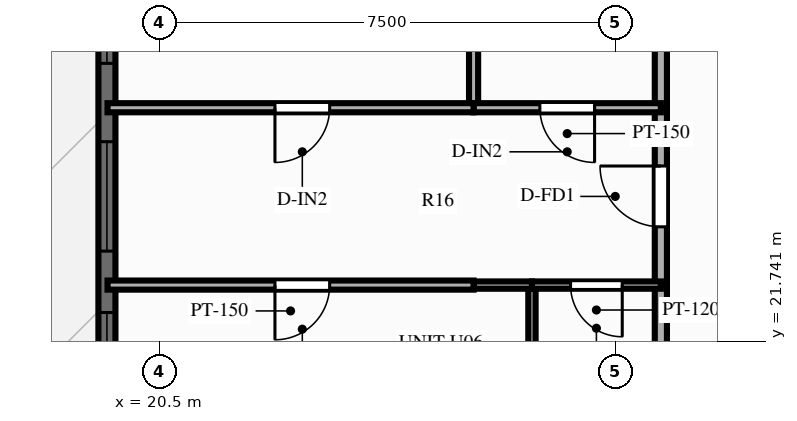
"""IFC4 building model, lengths in metres.
Left out: names, types, materials, properties, quantities, classifications, styles, units other than length and angle.
Written with IfcOpenShell. Run it as: python <this file> out.ifc"""

import sys

from ifc_helpers import new_model, si_unit, direction, frame, frame_2d, origin, place, context, subcontext, project, spatial, rectangle, extrude, source, transform, mapped, element, fill, save


model = new_model("IFC4")
c1 = context("Model", 3, precision=1e-05, world=origin(), true_north=direction((0.0, 1.0)))
c2 = subcontext(c1, "Body", "Model", "MODEL_VIEW")
j1 = project(units=[si_unit("LENGTHUNIT", "METRE"), si_unit("PLANEANGLEUNIT", "RADIAN")], contexts=[c1])
p1 = place(None, origin())
s1 = spatial("IfcSite", under=j1, at=p1, CompositionType="ELEMENT")
p2 = place(p1, origin())
s2 = spatial("IfcBuilding", under=s1, at=p2, CompositionType="ELEMENT")
p3 = place(p2, frame((0.0, 0.0, 202.6)))
s3 = spatial("IfcBuildingStorey", under=s2, at=p3, CompositionType="ELEMENT", Elevation=202.6)
p4 = place(p3, frame((19.64, 11.5, 0.0), z_axis=(0.0, 0.0, 1.0), x_axis=(0.0, 1.0, 0.0)))
e1 = element("IfcWall", 1, at=p4, inside=s3, PredefinedType="SOLIDWALL", context=c2, shape_type="SweptSolid", body=[
    extrude(rectangle(XDim=31.0, YDim=0.28, at=frame_2d((15.5, 0.0))), origin(), (0.0, 0.0, 1.0), 2.79),
])
p5 = place(p4, frame((0.661, 0.0, 0.85)))
e2 = element("IfcOpeningElement", 2, at=p5, cuts=e1, PredefinedType="OPENING", context=c2, shape_type="SweptSolid", body=[
    extrude(rectangle(XDim=1.5, YDim=1.65, at=frame_2d((0.75, 0.825))), frame((0.0, 0.152, 0.0), z_axis=(0.0, -1.0, 0.0), x_axis=(1.0, 0.0, 0.0)), (0.0, 0.0, 1.0), 0.304),
])
p6 = place(p4, frame((3.131, 0.0, 0.85)))
e3 = element("IfcOpeningElement", 3, at=p6, cuts=e1, PredefinedType="OPENING", context=c2, shape_type="SweptSolid", body=[
    extrude(rectangle(XDim=1.5, YDim=1.65, at=frame_2d((0.75, 0.825))), frame((0.0, 0.152, 0.0), z_axis=(0.0, -1.0, 0.0), x_axis=(1.0, 0.0, 0.0)), (0.0, 0.0, 1.0), 0.304),
])
p7 = place(p4, frame((7.15, 0.0, 0.85)))
e4 = element("IfcOpeningElement", 4, at=p7, cuts=e1, PredefinedType="OPENING", context=c2, shape_type="SweptSolid", body=[
    extrude(rectangle(XDim=1.2, YDim=1.5, at=frame_2d((0.6, 0.75))), frame((0.0, 0.152, 0.0), z_axis=(0.0, -1.0, 0.0), x_axis=(1.0, 0.0, 0.0)), (0.0, 0.0, 1.0), 0.304),
])
p8 = place(p4, frame((9.21, 0.0, 0.85)))
e5 = element("IfcOpeningElement", 5, at=p8, cuts=e1, PredefinedType="OPENING", context=c2, shape_type="SweptSolid", body=[
    extrude(rectangle(XDim=1.5, YDim=1.65, at=frame_2d((0.75, 0.825))), frame((0.0, 0.152, 0.0), z_axis=(0.0, -1.0, 0.0), x_axis=(1.0, 0.0, 0.0)), (0.0, 0.0, 1.0), 0.304),
])
p9 = place(p4, frame((11.72, 0.0, 0.85)))
e6 = element("IfcOpeningElement", 6, at=p9, cuts=e1, PredefinedType="OPENING", context=c2, shape_type="SweptSolid", body=[
    extrude(rectangle(XDim=1.8, YDim=1.65, at=frame_2d((0.9, 0.825))), frame((0.0, 0.152, 0.0), z_axis=(0.0, -1.0, 0.0), x_axis=(1.0, 0.0, 0.0)), (0.0, 0.0, 1.0), 0.304),
])
p10 = place(p4, frame((14.808, 0.0, 0.85)))
e7 = element("IfcOpeningElement", 7, at=p10, cuts=e1, PredefinedType="OPENING", context=c2, shape_type="SweptSolid", body=[
    extrude(rectangle(XDim=1.8, YDim=1.65, at=frame_2d((0.9, 0.825))), frame((0.0, 0.152, 0.0), z_axis=(0.0, -1.0, 0.0), x_axis=(1.0, 0.0, 0.0)), (0.0, 0.0, 1.0), 0.304),
])
p11 = place(p4, frame((18.484, 0.0, 0.0)))
e8 = element("IfcOpeningElement", 8, at=p11, cuts=e1, PredefinedType="OPENING", context=c2, shape_type="SweptSolid", body=[
    extrude(rectangle(XDim=1.6, YDim=2.15, at=frame_2d((0.8, 1.075))), frame((0.0, 0.152, 0.0), z_axis=(0.0, -1.0, 0.0), x_axis=(1.0, 0.0, 0.0)), (0.0, 0.0, 1.0), 0.304),
])
p12 = place(p4, frame((21.754, 0.0, 0.85)))
e9 = element("IfcOpeningElement", 9, at=p12, cuts=e1, PredefinedType="OPENING", context=c2, shape_type="SweptSolid", body=[
    extrude(rectangle(XDim=1.8, YDim=1.65, at=frame_2d((0.9, 0.825))), frame((0.0, 0.152, 0.0), z_axis=(0.0, -1.0, 0.0), x_axis=(1.0, 0.0, 0.0)), (0.0, 0.0, 1.0), 0.304),
])
p13 = place(p4, frame((25.235, 0.0, 0.85)))
e10 = element("IfcOpeningElement", 10, at=p13, cuts=e1, PredefinedType="OPENING", context=c2, shape_type="SweptSolid", body=[
    extrude(rectangle(XDim=1.2, YDim=1.5, at=frame_2d((0.6, 0.75))), frame((0.0, 0.152, 0.0), z_axis=(0.0, -1.0, 0.0), x_axis=(1.0, 0.0, 0.0)), (0.0, 0.0, 1.0), 0.304),
])
p14 = place(p4, frame((27.945, 0.0, 0.85)))
e11 = element("IfcOpeningElement", 11, at=p14, cuts=e1, PredefinedType="OPENING", context=c2, shape_type="SweptSolid", body=[
    extrude(rectangle(XDim=1.8, YDim=1.65, at=frame_2d((0.9, 0.825))), frame((0.0, 0.152, 0.0), z_axis=(0.0, -1.0, 0.0), x_axis=(1.0, 0.0, 0.0)), (0.0, 0.0, 1.0), 0.304),
])
p15 = place(p3, frame((28.75, 20.259, 0.0), z_axis=(0.0, 0.0, 1.0), x_axis=(0.0, 1.0, 0.0)))
e12 = element("IfcWall", 12, at=p15, inside=s3, PredefinedType="PARTITIONING", context=c2, shape_type="SweptSolid", body=[
    extrude(rectangle(XDim=2.402, YDim=0.2, at=frame_2d((1.201, 0.0))), origin(), (0.0, 0.0, 1.0), 3.6),
])
p16 = place(p3, frame((28.75, 22.661, 0.0), z_axis=(0.0, 0.0, 1.0), x_axis=(0.0, 1.0, 0.0)))
e13 = element("IfcWall", 13, at=p16, inside=s3, PredefinedType="PARTITIONING", context=c2, shape_type="SweptSolid", body=[
    extrude(rectangle(XDim=2.917, YDim=0.2, at=frame_2d((1.458, 0.0))), origin(), (0.0, 0.0, 1.0), 3.6),
])
p17 = place(p16, frame((0.958, 0.0, 0.0)))
e14 = element("IfcOpeningElement", 14, at=p17, cuts=e13, PredefinedType="OPENING", context=c2, shape_type="SweptSolid", body=[
    extrude(rectangle(XDim=1.0, YDim=2.15, at=frame_2d((0.5, 1.075))), frame((0.0, 0.112, 0.0), z_axis=(0.0, -1.0, 0.0), x_axis=(1.0, 0.0, 0.0)), (0.0, 0.0, 1.0), 0.224),
])
p18 = place(p3, frame((28.75, 25.578, 0.0), z_axis=(0.0, 0.0, 1.0), x_axis=(0.0, 1.0, 0.0)))
e15 = element("IfcWall", 15, at=p18, inside=s3, PredefinedType="PARTITIONING", context=c2, shape_type="SweptSolid", body=[
    extrude(rectangle(XDim=3.26, YDim=0.2, at=frame_2d((1.63, 0.0))), origin(), (0.0, 0.0, 1.0), 3.6),
])
p19 = place(p3, frame((26.63, 20.259, 0.0), z_axis=(0.0, 0.0, 1.0), x_axis=(0.0, 1.0, 0.0)))
e16 = element("IfcWall", 16, at=p19, inside=s3, PredefinedType="PARTITIONING", context=c2, shape_type="SweptSolid", body=[
    extrude(rectangle(XDim=2.402, YDim=0.12, at=frame_2d((1.201, 0.0))), origin(), (0.0, 0.0, 1.0), 3.6),
])
p20 = place(p3, frame((25.67, 25.578, 0.0), z_axis=(0.0, 0.0, 1.0), x_axis=(0.0, 1.0, 0.0)))
e17 = element("IfcWall", 17, at=p20, inside=s3, PredefinedType="PARTITIONING", context=c2, shape_type="SweptSolid", body=[
    extrude(rectangle(XDim=3.26, YDim=0.15, at=frame_2d((1.63, 0.0))), origin(), (0.0, 0.0, 1.0), 3.39),
])
p21 = place(p3, frame((28.75, 22.661, 0.0), z_axis=(0.0, 0.0, 1.0), x_axis=(-1.0, 0.0, 0.0)))
e18 = element("IfcWall", 18, at=p21, inside=s3, PredefinedType="PARTITIONING", context=c2, shape_type="SweptSolid", body=[
    extrude(rectangle(XDim=2.12, YDim=0.12, at=frame_2d((1.06, 0.0))), origin(), (0.0, 0.0, 1.0), 3.6),
])
p22 = place(p21, frame((0.635, 0.0, 0.0)))
e19 = element("IfcOpeningElement", 19, at=p22, cuts=e18, PredefinedType="OPENING", context=c2, shape_type="SweptSolid", body=[
    extrude(rectangle(XDim=0.85, YDim=2.05, at=frame_2d((0.425, 1.025))), frame((0.0, 0.072, 0.0), z_axis=(0.0, -1.0, 0.0), x_axis=(1.0, 0.0, 0.0)), (0.0, 0.0, 1.0), 0.144),
])
p23 = place(p3, frame((26.63, 22.661, 0.0), z_axis=(0.0, 0.0, 1.0), x_axis=(-1.0, 0.0, 0.0)))
e20 = element("IfcWall", 20, at=p23, inside=s3, PredefinedType="PARTITIONING", context=c2, shape_type="SweptSolid", body=[
    extrude(rectangle(XDim=0.96, YDim=0.12, at=frame_2d((0.48, 0.0))), origin(), (0.0, 0.0, 1.0), 3.6),
])
p24 = place(p3, frame((25.67, 22.661, 0.0), z_axis=(0.0, 0.0, 1.0), x_axis=(-1.0, 0.0, 0.0)))
e21 = element("IfcWall", 21, at=p24, inside=s3, PredefinedType="PARTITIONING", context=c2, shape_type="SweptSolid", body=[
    extrude(rectangle(XDim=6.02, YDim=0.15, at=frame_2d((3.01, 0.0))), origin(), (0.0, 0.0, 1.0), 3.6),
])
p25 = place(p24, frame((2.367, 0.0, 0.0)))
e22 = element("IfcOpeningElement", 22, at=p25, cuts=e21, PredefinedType="OPENING", context=c2, shape_type="SweptSolid", body=[
    extrude(rectangle(XDim=0.9, YDim=2.1, at=frame_2d((0.45, 1.05))), frame((0.0, 0.087, 0.0), z_axis=(0.0, -1.0, 0.0), x_axis=(1.0, 0.0, 0.0)), (0.0, 0.0, 1.0), 0.174),
])
p26 = place(p3, frame((28.75, 25.578, 0.0), z_axis=(0.0, 0.0, 1.0), x_axis=(-1.0, 0.0, 0.0)))
e23 = element("IfcWall", 23, at=p26, inside=s3, PredefinedType="PARTITIONING", context=c2, shape_type="SweptSolid", body=[
    extrude(rectangle(XDim=3.08, YDim=0.15, at=frame_2d((1.54, 0.0))), origin(), (0.0, 0.0, 1.0), 3.6),
])
p27 = place(p26, frame((1.09, 0.0, 0.0)))
e24 = element("IfcOpeningElement", 24, at=p27, cuts=e23, PredefinedType="OPENING", context=c2, shape_type="SweptSolid", body=[
    extrude(rectangle(XDim=0.9, YDim=2.1, at=frame_2d((0.45, 1.05))), frame((0.0, 0.087, 0.0), z_axis=(0.0, -1.0, 0.0), x_axis=(1.0, 0.0, 0.0)), (0.0, 0.0, 1.0), 0.174),
])
p28 = place(p3, frame((25.67, 25.578, 0.0), z_axis=(0.0, 0.0, 1.0), x_axis=(-1.0, 0.0, 0.0)))
e25 = element("IfcWall", 25, at=p28, inside=s3, PredefinedType="PARTITIONING", context=c2, shape_type="SweptSolid", body=[
    extrude(rectangle(XDim=6.02, YDim=0.15, at=frame_2d((3.01, 0.0))), origin(), (0.0, 0.0, 1.0), 3.6),
])
p29 = place(p28, frame((2.367, 0.0, 0.0)))
e26 = element("IfcOpeningElement", 26, at=p29, cuts=e25, PredefinedType="OPENING", context=c2, shape_type="SweptSolid", body=[
    extrude(rectangle(XDim=0.9, YDim=2.1, at=frame_2d((0.45, 1.05))), frame((0.0, 0.087, 0.0), z_axis=(0.0, -1.0, 0.0), x_axis=(1.0, 0.0, 0.0)), (0.0, 0.0, 1.0), 0.174),
])
m1 = source(origin(), c2, "Body", "SweptSolid", [
    extrude(rectangle(XDim=1.5, YDim=1.65, at=frame_2d((0.75, 0.825))), frame((0.0, 0.03, 0.0), z_axis=(0.0, -1.0, 0.0), x_axis=(1.0, 0.0, 0.0)), (0.0, 0.0, 1.0), 0.06),
])
p30 = place(p8, origin())
e27 = element("IfcWindow", 27, at=p30, inside=s3, PartitioningType="SINGLE_PANEL", PredefinedType="WINDOW", context=c2, shape_type="MappedRepresentation", body=[
    mapped(m1, transform((0.0, 0.0, 0.0), scale=1.0)),
])
fill(e5, e27)
m2 = source(origin(), c2, "Body", "SweptSolid", [
    extrude(rectangle(XDim=1.8, YDim=1.65, at=frame_2d((0.9, 0.825))), frame((0.0, 0.03, 0.0), z_axis=(0.0, -1.0, 0.0), x_axis=(1.0, 0.0, 0.0)), (0.0, 0.0, 1.0), 0.06),
])
p31 = place(p9, origin())
e28 = element("IfcWindow", 28, at=p31, inside=s3, PartitioningType="SINGLE_PANEL", PredefinedType="WINDOW", context=c2, shape_type="MappedRepresentation", body=[
    mapped(m2, transform((0.0, 0.0, 0.0), scale=1.0)),
])
fill(e6, e28)
p32 = place(p10, origin())
e29 = element("IfcWindow", 29, at=p32, inside=s3, PartitioningType="SINGLE_PANEL", PredefinedType="WINDOW", context=c2, shape_type="MappedRepresentation", body=[
    mapped(m2, transform((0.0, 0.0, 0.0), scale=1.0)),
])
fill(e7, e29)
m3 = source(origin(), c2, "Body", "SweptSolid", [
    extrude(rectangle(XDim=1.0, YDim=2.15, at=frame_2d((0.5, 1.075))), frame((0.0, 0.025, 0.0), z_axis=(0.0, -1.0, 0.0), x_axis=(1.0, 0.0, 0.0)), (0.0, 0.0, 1.0), 0.05),
])
p33 = place(p17, origin())
e30 = element("IfcDoor", 30, at=p33, inside=s3, OperationType="SINGLE_SWING_RIGHT", PredefinedType="DOOR", context=c2, shape_type="MappedRepresentation", body=[
    mapped(m3, transform((0.0, 0.0, 0.0), scale=1.0)),
])
fill(e14, e30)
m4 = source(origin(), c2, "Body", "SweptSolid", [
    extrude(rectangle(XDim=0.85, YDim=2.05, at=frame_2d((0.425, 1.025))), frame((0.0, 0.025, 0.0), z_axis=(0.0, -1.0, 0.0), x_axis=(1.0, 0.0, 0.0)), (0.0, 0.0, 1.0), 0.05),
])
p34 = place(p22, origin())
e31 = element("IfcDoor", 31, at=p34, inside=s3, OperationType="SINGLE_SWING_LEFT", PredefinedType="DOOR", context=c2, shape_type="MappedRepresentation", body=[
    mapped(m4, transform((0.0, 0.0, 0.0), scale=1.0)),
])
fill(e19, e31)
m5 = source(origin(), c2, "Body", "SweptSolid", [
    extrude(rectangle(XDim=0.9, YDim=2.1, at=frame_2d((0.45, 1.05))), frame((0.0, 0.025, 0.0), z_axis=(0.0, -1.0, 0.0), x_axis=(1.0, 0.0, 0.0)), (0.0, 0.0, 1.0), 0.05),
])
p35 = place(p25, origin())
e32 = element("IfcDoor", 32, at=p35, inside=s3, OperationType="SINGLE_SWING_RIGHT", PredefinedType="DOOR", context=c2, shape_type="MappedRepresentation", body=[
    mapped(m5, transform((0.0, 0.0, 0.0), scale=1.0)),
])
fill(e22, e32)
p36 = place(p27, origin())
e33 = element("IfcDoor", 33, at=p36, inside=s3, OperationType="SINGLE_SWING_LEFT", PredefinedType="DOOR", context=c2, shape_type="MappedRepresentation", body=[
    mapped(m5, transform((0.0, 0.0, 0.0), scale=1.0)),
])
fill(e24, e33)
p37 = place(p29, origin())
e34 = element("IfcDoor", 34, at=p37, inside=s3, OperationType="SINGLE_SWING_RIGHT", PredefinedType="DOOR", context=c2, shape_type="MappedRepresentation", body=[
    mapped(m5, transform((0.0, 0.0, 0.0), scale=1.0)),
])
fill(e26, e34)
save(model, sys.argv[1])
